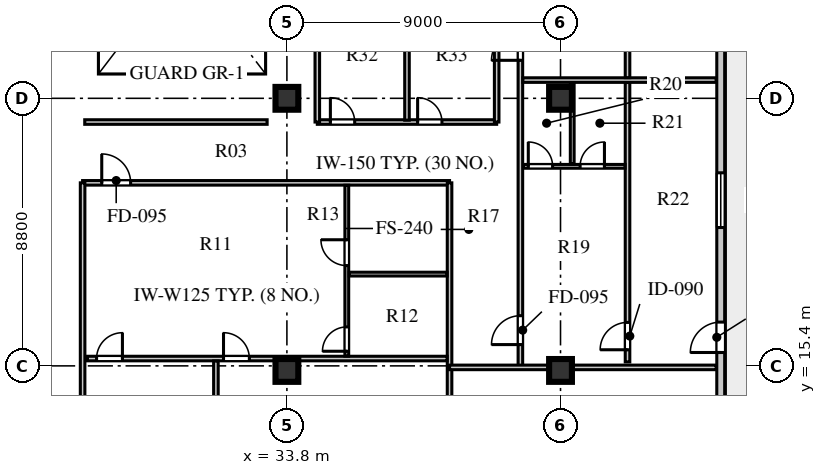
"""IFC4 building model, lengths in metres.
Left out: names, types, materials, properties, quantities, classifications, styles, units other than length and angle.
Written with IfcOpenShell. Run it as: python <this file> out.ifc"""

import sys

from ifc_helpers import new_model, si_unit, direction, frame, frame_2d, origin, origin_2d, place, context, subcontext, project, spatial, rectangle, extrude, element, fill, save


model = new_model("IFC4")
c1 = context("Model", 3, precision=1e-05, world=origin(), true_north=direction((0.0, 1.0)))
c2 = subcontext(c1, "Body", "Model", "MODEL_VIEW")
j1 = project(units=[si_unit("LENGTHUNIT", "METRE"), si_unit("PLANEANGLEUNIT", "RADIAN")], contexts=[c1])
p1 = place(None, origin())
s1 = spatial("IfcSite", under=j1, at=p1, CompositionType="ELEMENT")
p2 = place(p1, origin())
s2 = spatial("IfcBuilding", under=s1, at=p2, CompositionType="ELEMENT")
p3 = place(p2, frame((0.0, 0.0, 320.1)))
s3 = spatial("IfcBuildingStorey", under=s2, at=p3, CompositionType="ELEMENT", Elevation=320.1)
for number, where, z_axis, x_axis in (
    (1, (33.8, 15.25, 0.0), (0.0, 0.0, 1.0), (1.0, 0.0, 0.0)),
    (2, (33.8, 24.2, 0.0), (0.0, 0.0, 1.0), (1.0, 0.0, 0.0)),
    (3, (42.8, 15.25, 0.0), (0.0, 0.0, 1.0), (1.0, 0.0, 0.0)),
    (4, (42.8, 24.2, 0.0), (0.0, 0.0, 1.0), (1.0, 0.0, 0.0)),
):
    element("IfcColumn", number, at=place(p3, frame(where, z_axis=z_axis, x_axis=x_axis)), inside=s3, PredefinedType="COLUMN", context=c2, shape_type="SweptSolid", body=[
        extrude(rectangle(XDim=0.75, YDim=0.75, at=origin_2d()), origin(), (0.0, 0.0, 1.0), 3.56),
    ])
p4 = place(p3, frame((48.07, 13.41, 0.0), z_axis=(0.0, 0.0, 1.0), x_axis=(0.0, 1.0, 0.0)))
e5 = element("IfcWall", 5, at=p4, inside=s3, PredefinedType="SOLIDWALL", context=c2, shape_type="SweptSolid", body=[
    extrude(rectangle(XDim=30.38, YDim=0.26, at=frame_2d((15.19, 0.0))), origin(), (0.0, 0.0, 1.0), 3.56),
])
p5 = place(p4, frame((2.43, 0.0, 0.0)))
e6 = element("IfcOpeningElement", 6, at=p5, cuts=e5, PredefinedType="OPENING", context=c2, shape_type="SweptSolid", body=[
    extrude(rectangle(XDim=1.0, YDim=2.05, at=frame_2d((0.5, 1.025))), frame((0.0, 0.14, 0.0), z_axis=(0.0, -1.0, 0.0), x_axis=(1.0, 0.0, 0.0)), (0.0, 0.0, 1.0), 0.28),
])
p6 = place(p4, frame((6.54, 0.0, 0.8)))
e7 = element("IfcOpeningElement", 7, at=p6, cuts=e5, PredefinedType="OPENING", context=c2, shape_type="SweptSolid", body=[
    extrude(rectangle(XDim=1.8, YDim=2.0, at=frame_2d((0.9, 1.0))), frame((0.0, 0.14, 0.0), z_axis=(0.0, -1.0, 0.0), x_axis=(1.0, 0.0, 0.0)), (0.0, 0.0, 1.0), 0.28),
])
p7 = place(p4, frame((12.89, 0.0, 0.8)))
e8 = element("IfcOpeningElement", 8, at=p7, cuts=e5, PredefinedType="OPENING", context=c2, shape_type="SweptSolid", body=[
    extrude(rectangle(XDim=1.5, YDim=2.0, at=frame_2d((0.75, 1.0))), frame((0.0, 0.14, 0.0), z_axis=(0.0, -1.0, 0.0), x_axis=(1.0, 0.0, 0.0)), (0.0, 0.0, 1.0), 0.28),
])
p8 = place(p4, frame((17.54, 0.0, 0.8)))
e9 = element("IfcOpeningElement", 9, at=p8, cuts=e5, PredefinedType="OPENING", context=c2, shape_type="SweptSolid", body=[
    extrude(rectangle(XDim=1.2, YDim=1.75, at=frame_2d((0.6, 0.875))), frame((0.0, 0.14, 0.0), z_axis=(0.0, -1.0, 0.0), x_axis=(1.0, 0.0, 0.0)), (0.0, 0.0, 1.0), 0.28),
])
p9 = place(p4, frame((23.215, 0.0, 0.8)))
e10 = element("IfcOpeningElement", 10, at=p9, cuts=e5, PredefinedType="OPENING", context=c2, shape_type="SweptSolid", body=[
    extrude(rectangle(XDim=2.4, YDim=2.05, at=frame_2d((1.2, 1.025))), frame((0.0, 0.14, 0.0), z_axis=(0.0, -1.0, 0.0), x_axis=(1.0, 0.0, 0.0)), (0.0, 0.0, 1.0), 0.28),
])
p10 = place(p3, frame((27.08, 21.42, 0.0), z_axis=(0.0, 0.0, 1.0), x_axis=(1.0, 0.0, 0.0)))
e11 = element("IfcWall", 11, at=p10, inside=s3, PredefinedType="PARTITIONING", context=c2, shape_type="SweptSolid", body=[
    extrude(rectangle(XDim=12.07, YDim=0.15, at=frame_2d((6.035, 0.0))), origin(), (0.0, 0.0, 1.0), 3.26),
])
p11 = place(p10, frame((0.63, 0.0, 0.0)))
e12 = element("IfcOpeningElement", 12, at=p11, cuts=e11, PredefinedType="OPENING", context=c2, shape_type="SweptSolid", body=[
    extrude(rectangle(XDim=0.95, YDim=2.1, at=frame_2d((0.475, 1.05))), frame((0.0, 0.085, 0.0), z_axis=(0.0, -1.0, 0.0), x_axis=(1.0, 0.0, 0.0)), (0.0, 0.0, 1.0), 0.17),
])
p12 = place(p3, frame((27.08, 10.38, 0.0), z_axis=(0.0, 0.0, 1.0), x_axis=(0.0, 1.0, 0.0)))
e13 = element("IfcWall", 13, at=p12, inside=s3, PredefinedType="PARTITIONING", context=c2, shape_type="SweptSolid", body=[
    extrude(rectangle(XDim=11.04, YDim=0.15, at=frame_2d((5.52, 0.0))), origin(), (0.0, 0.0, 1.0), 3.56),
])
p13 = place(p3, frame((27.15, 23.42, 0.0), z_axis=(0.0, 0.0, 1.0), x_axis=(1.0, 0.0, 0.0)))
e14 = element("IfcWall", 14, at=p13, inside=s3, PredefinedType="PARTITIONING", context=c2, shape_type="SweptSolid", body=[
    extrude(rectangle(XDim=6.0, YDim=0.15, at=frame_2d((3.0, 0.0))), origin(), (0.0, 0.0, 1.0), 3.56),
])
p14 = place(p3, frame((39.15, 10.38, 0.0), z_axis=(0.0, 0.0, 1.0), x_axis=(0.0, 1.0, 0.0)))
e15 = element("IfcWall", 15, at=p14, inside=s3, PredefinedType="PARTITIONING", context=c2, shape_type="SweptSolid", body=[
    extrude(rectangle(XDim=11.04, YDim=0.15, at=frame_2d((5.52, 0.0))), origin(), (0.0, 0.0, 1.0), 3.56),
])
p15 = place(p3, frame((27.24, 15.641, 0.0), z_axis=(0.0, 0.0, 1.0), x_axis=(1.0, 0.0, 0.0)))
e16 = element("IfcWall", 16, at=p15, inside=s3, PredefinedType="PARTITIONING", context=c2, shape_type="SweptSolid", body=[
    extrude(rectangle(XDim=11.83, YDim=0.15, at=frame_2d((5.915, 0.0))), origin(), (0.0, 0.0, 1.0), 3.56),
])
p16 = place(p15, frame((0.3, 0.0, 0.0)))
e17 = element("IfcOpeningElement", 17, at=p16, cuts=e16, PredefinedType="OPENING", context=c2, shape_type="SweptSolid", body=[
    extrude(rectangle(XDim=0.85, YDim=2.08, at=frame_2d((0.425, 1.04))), frame((0.0, 0.085, 0.0), z_axis=(0.0, -1.0, 0.0), x_axis=(1.0, 0.0, 0.0)), (0.0, 0.0, 1.0), 0.17),
])
p17 = place(p15, frame((4.475, 0.0, 0.0)))
e18 = element("IfcOpeningElement", 18, at=p17, cuts=e16, PredefinedType="OPENING", context=c2, shape_type="SweptSolid", body=[
    extrude(rectangle(XDim=0.85, YDim=2.08, at=frame_2d((0.425, 1.04))), frame((0.0, 0.085, 0.0), z_axis=(0.0, -1.0, 0.0), x_axis=(1.0, 0.0, 0.0)), (0.0, 0.0, 1.0), 0.17),
])
p18 = place(p3, frame((35.77, 15.721, 0.0), z_axis=(0.0, 0.0, 1.0), x_axis=(0.0, 1.0, 0.0)))
e19 = element("IfcWall", 19, at=p18, inside=s3, PredefinedType="PLUMBINGWALL", context=c2, shape_type="SweptSolid", body=[
    extrude(rectangle(XDim=5.619, YDim=0.125, at=frame_2d((2.81, 0.0))), origin(), (0.0, 0.0, 1.0), 3.56),
])
p19 = place(p18, frame((0.16, 0.0, 0.0)))
e20 = element("IfcOpeningElement", 20, at=p19, cuts=e19, PredefinedType="OPENING", context=c2, shape_type="SweptSolid", body=[
    extrude(rectangle(XDim=0.8, YDim=2.05, at=frame_2d((0.4, 1.025))), frame((0.0, 0.073, 0.0), z_axis=(0.0, -1.0, 0.0), x_axis=(1.0, 0.0, 0.0)), (0.0, 0.0, 1.0), 0.145),
])
p20 = place(p18, frame((2.977, 0.0, 0.0)))
e21 = element("IfcOpeningElement", 21, at=p20, cuts=e19, PredefinedType="OPENING", context=c2, shape_type="SweptSolid", body=[
    extrude(rectangle(XDim=0.85, YDim=2.08, at=frame_2d((0.425, 1.04))), frame((0.0, 0.073, 0.0), z_axis=(0.0, -1.0, 0.0), x_axis=(1.0, 0.0, 0.0)), (0.0, 0.0, 1.0), 0.145),
])
p21 = place(p3, frame((35.85, 18.418, 0.0), z_axis=(0.0, 0.0, 1.0), x_axis=(1.0, 0.0, 0.0)))
e22 = element("IfcWall", 22, at=p21, inside=s3, PredefinedType="PLUMBINGWALL", context=c2, shape_type="SweptSolid", body=[
    extrude(rectangle(XDim=3.22, YDim=0.125, at=frame_2d((1.61, 0.0))), origin(), (0.0, 0.0, 1.0), 3.26),
])
p22 = place(p3, frame((31.465, 10.38, 0.0), z_axis=(0.0, 0.0, 1.0), x_axis=(0.0, 1.0, 0.0)))
e23 = element("IfcWall", 23, at=p22, inside=s3, PredefinedType="PARTITIONING", context=c2, shape_type="SweptSolid", body=[
    extrude(rectangle(XDim=5.181, YDim=0.15, at=frame_2d((2.591, 0.0))), origin(), (0.0, 0.0, 1.0), 3.56),
])
p23 = place(p3, frame((41.48, 15.35, 0.0), z_axis=(0.0, 0.0, 1.0), x_axis=(0.0, 1.0, 0.0)))
e24 = element("IfcWall", 24, at=p23, inside=s3, PredefinedType="PARTITIONING", context=c2, shape_type="SweptSolid", body=[
    extrude(rectangle(XDim=26.5, YDim=0.15, at=frame_2d((13.25, 0.0))), origin(), (0.0, 0.0, 1.0), 3.56),
])
p24 = place(p23, frame((0.75, 0.0, 0.0)))
e25 = element("IfcOpeningElement", 25, at=p24, cuts=e24, PredefinedType="OPENING", context=c2, shape_type="SweptSolid", body=[
    extrude(rectangle(XDim=0.95, YDim=2.1, at=frame_2d((0.475, 1.05))), frame((0.0, 0.085, 0.0), z_axis=(0.0, -1.0, 0.0), x_axis=(1.0, 0.0, 0.0)), (0.0, 0.0, 1.0), 0.17),
])
p25 = place(p23, frame((10.1, 0.0, 0.0)))
e26 = element("IfcOpeningElement", 26, at=p25, cuts=e24, PredefinedType="OPENING", context=c2, shape_type="SweptSolid", body=[
    extrude(rectangle(XDim=0.95, YDim=2.1, at=frame_2d((0.475, 1.05))), frame((0.0, 0.085, 0.0), z_axis=(0.0, -1.0, 0.0), x_axis=(1.0, 0.0, 0.0)), (0.0, 0.0, 1.0), 0.17),
])
p26 = place(p23, frame((19.1, 0.0, 0.0)))
e27 = element("IfcOpeningElement", 27, at=p26, cuts=e24, PredefinedType="OPENING", context=c2, shape_type="SweptSolid", body=[
    extrude(rectangle(XDim=0.95, YDim=2.1, at=frame_2d((0.475, 1.05))), frame((0.0, 0.085, 0.0), z_axis=(0.0, -1.0, 0.0), x_axis=(1.0, 0.0, 0.0)), (0.0, 0.0, 1.0), 0.17),
])
p27 = place(p3, frame((39.15, 15.35, 0.0), z_axis=(0.0, 0.0, 1.0), x_axis=(1.0, 0.0, 0.0)))
e28 = element("IfcWall", 28, at=p27, inside=s3, PredefinedType="PARTITIONING", context=c2, shape_type="SweptSolid", body=[
    extrude(rectangle(XDim=8.77, YDim=0.15, at=frame_2d((4.385, 0.0))), origin(), (0.0, 0.0, 1.0), 2.96),
])
p28 = place(p3, frame((45.004, 15.53, 0.0), z_axis=(0.0, 0.0, 1.0), x_axis=(0.0, 1.0, 0.0)))
e29 = element("IfcWall", 29, at=p28, inside=s3, PredefinedType="PARTITIONING", context=c2, shape_type="SweptSolid", body=[
    extrude(rectangle(XDim=9.19, YDim=0.15, at=frame_2d((4.595, 0.0))), origin(), (0.0, 0.0, 1.0), 3.56),
])
p29 = place(p28, frame((0.4, 0.0, 0.0)))
e30 = element("IfcOpeningElement", 30, at=p29, cuts=e29, PredefinedType="OPENING", context=c2, shape_type="SweptSolid", body=[
    extrude(rectangle(XDim=0.9, YDim=2.08, at=frame_2d((0.45, 1.04))), frame((0.0, 0.085, 0.0), z_axis=(0.0, -1.0, 0.0), x_axis=(1.0, 0.0, 0.0)), (0.0, 0.0, 1.0), 0.17),
])
p30 = place(p3, frame((41.58, 21.963, 0.0), z_axis=(0.0, 0.0, 1.0), x_axis=(1.0, 0.0, 0.0)))
e31 = element("IfcWall", 31, at=p30, inside=s3, PredefinedType="PLUMBINGWALL", context=c2, shape_type="SweptSolid", body=[
    extrude(rectangle(XDim=3.344, YDim=0.125, at=frame_2d((1.672, 0.0))), origin(), (0.0, 0.0, 1.0), 3.56),
])
p31 = place(p30, frame((0.16, 0.0, 0.0)))
e32 = element("IfcOpeningElement", 32, at=p31, cuts=e31, PredefinedType="OPENING", context=c2, shape_type="SweptSolid", body=[
    extrude(rectangle(XDim=0.8, YDim=2.05, at=frame_2d((0.4, 1.025))), frame((0.0, 0.073, 0.0), z_axis=(0.0, -1.0, 0.0), x_axis=(1.0, 0.0, 0.0)), (0.0, 0.0, 1.0), 0.145),
])
p32 = place(p30, frame((1.865, 0.0, 0.0)))
e33 = element("IfcOpeningElement", 33, at=p32, cuts=e31, PredefinedType="OPENING", context=c2, shape_type="SweptSolid", body=[
    extrude(rectangle(XDim=0.8, YDim=2.05, at=frame_2d((0.4, 1.025))), frame((0.0, 0.073, 0.0), z_axis=(0.0, -1.0, 0.0), x_axis=(1.0, 0.0, 0.0)), (0.0, 0.0, 1.0), 0.145),
])
p33 = place(p3, frame((43.185, 22.043, 0.0), z_axis=(0.0, 0.0, 1.0), x_axis=(0.0, 1.0, 0.0)))
e34 = element("IfcWall", 34, at=p33, inside=s3, PredefinedType="PLUMBINGWALL", context=c2, shape_type="SweptSolid", body=[
    extrude(rectangle(XDim=2.677, YDim=0.125, at=frame_2d((1.338, 0.0))), origin(), (0.0, 0.0, 1.0), 3.56),
])
p34 = place(p3, frame((41.56, 24.8, 0.0), z_axis=(0.0, 0.0, 1.0), x_axis=(1.0, 0.0, 0.0)))
e35 = element("IfcWall", 35, at=p34, inside=s3, PredefinedType="PARTITIONING", context=c2, shape_type="SweptSolid", body=[
    extrude(rectangle(XDim=6.36, YDim=0.15, at=frame_2d((3.18, 0.0))), origin(), (0.0, 0.0, 1.0), 3.56),
])
p35 = place(p3, frame((45.004, 24.88, 0.0), z_axis=(0.0, 0.0, 1.0), x_axis=(0.0, 1.0, 0.0)))
e36 = element("IfcWall", 36, at=p35, inside=s3, PredefinedType="PARTITIONING", context=c2, shape_type="SweptSolid", body=[
    extrude(rectangle(XDim=8.84, YDim=0.15, at=frame_2d((4.42, 0.0))), origin(), (0.0, 0.0, 1.0), 3.56),
])
p36 = place(p35, frame((3.37, 0.0, 0.0)))
e37 = element("IfcOpeningElement", 37, at=p36, cuts=e36, PredefinedType="OPENING", context=c2, shape_type="SweptSolid", body=[
    extrude(rectangle(XDim=0.85, YDim=2.08, at=frame_2d((0.425, 1.04))), frame((0.0, 0.085, 0.0), z_axis=(0.0, -1.0, 0.0), x_axis=(1.0, 0.0, 0.0)), (0.0, 0.0, 1.0), 0.17),
])
p37 = place(p35, frame((4.67, 0.0, 0.0)))
e38 = element("IfcOpeningElement", 38, at=p37, cuts=e36, PredefinedType="OPENING", context=c2, shape_type="SweptSolid", body=[
    extrude(rectangle(XDim=0.85, YDim=2.08, at=frame_2d((0.425, 1.04))), frame((0.0, 0.085, 0.0), z_axis=(0.0, -1.0, 0.0), x_axis=(1.0, 0.0, 0.0)), (0.0, 0.0, 1.0), 0.17),
])
p38 = place(p3, frame((34.8, 23.42, 0.0), z_axis=(0.0, 0.0, 1.0), x_axis=(1.0, 0.0, 0.0)))
e39 = element("IfcWall", 39, at=p38, inside=s3, PredefinedType="PARTITIONING", context=c2, shape_type="SweptSolid", body=[
    extrude(rectangle(XDim=5.9, YDim=0.15, at=frame_2d((2.95, 0.0))), origin(), (0.0, 0.0, 1.0), 3.56),
])
p39 = place(p38, frame((0.43, 0.0, 0.0)))
e40 = element("IfcOpeningElement", 40, at=p39, cuts=e39, PredefinedType="OPENING", context=c2, shape_type="SweptSolid", body=[
    extrude(rectangle(XDim=0.8, YDim=2.05, at=frame_2d((0.4, 1.025))), frame((0.0, 0.085, 0.0), z_axis=(0.0, -1.0, 0.0), x_axis=(1.0, 0.0, 0.0)), (0.0, 0.0, 1.0), 0.17),
])
p40 = place(p38, frame((3.3, 0.0, 0.0)))
e41 = element("IfcOpeningElement", 41, at=p40, cuts=e39, PredefinedType="OPENING", context=c2, shape_type="SweptSolid", body=[
    extrude(rectangle(XDim=0.8, YDim=2.05, at=frame_2d((0.4, 1.025))), frame((0.0, 0.085, 0.0), z_axis=(0.0, -1.0, 0.0), x_axis=(1.0, 0.0, 0.0)), (0.0, 0.0, 1.0), 0.17),
])
for number, where, z_axis, x_axis in (
    (42, (34.8, 23.42, 0.0), (0.0, 0.0, 1.0), (0.0, 1.0, 0.0)),
    (43, (40.7, 23.42, 0.0), (0.0, 0.0, 1.0), (0.0, 1.0, 0.0)),
):
    element("IfcWall", number, at=place(p3, frame(where, z_axis=z_axis, x_axis=x_axis)), inside=s3, PredefinedType="PARTITIONING", context=c2, shape_type="SweptSolid", body=[
        extrude(rectangle(XDim=3.78, YDim=0.15, at=frame_2d((1.89, 0.0))), origin(), (0.0, 0.0, 1.0), 3.56),
    ])
p41 = place(p3, frame((37.75, 23.48, 0.0), z_axis=(0.0, 0.0, 1.0), x_axis=(0.0, 1.0, 0.0)))
e44 = element("IfcWall", 44, at=p41, inside=s3, PredefinedType="PARTITIONING", context=c2, shape_type="SweptSolid", body=[
    extrude(rectangle(XDim=3.66, YDim=0.15, at=frame_2d((1.83, 0.0))), origin(), (0.0, 0.0, 1.0), 3.56),
])
p42 = place(p5, frame((1.0, 0.0, 0.0), z_axis=(0.0, 0.0, 1.0), x_axis=(-1.0, 0.0, 0.0)))
e45 = element("IfcDoor", 45, at=p42, inside=s3, OperationType="SINGLE_SWING_RIGHT", PredefinedType="DOOR", context=c2, shape_type="SweptSolid", body=[
    extrude(rectangle(XDim=1.0, YDim=2.05, at=frame_2d((0.5, 1.025))), frame((0.0, 0.025, 0.0), z_axis=(0.0, -1.0, 0.0), x_axis=(1.0, 0.0, 0.0)), (0.0, 0.0, 1.0), 0.05),
])
fill(e6, e45)
p43 = place(p6, origin())
e46 = element("IfcWindow", 46, at=p43, inside=s3, PartitioningType="SINGLE_PANEL", PredefinedType="WINDOW", context=c2, shape_type="SweptSolid", body=[
    extrude(rectangle(XDim=1.8, YDim=2.0, at=frame_2d((0.9, 1.0))), frame((0.0, 0.03, 0.0), z_axis=(0.0, -1.0, 0.0), x_axis=(1.0, 0.0, 0.0)), (0.0, 0.0, 1.0), 0.06),
])
fill(e7, e46)
p44 = place(p19, origin())
e47 = element("IfcDoor", 47, at=p44, inside=s3, OperationType="SINGLE_SWING_LEFT", PredefinedType="DOOR", context=c2, shape_type="SweptSolid", body=[
    extrude(rectangle(XDim=0.8, YDim=2.05, at=frame_2d((0.4, 1.025))), frame((0.0, 0.025, 0.0), z_axis=(0.0, -1.0, 0.0), x_axis=(1.0, 0.0, 0.0)), (0.0, 0.0, 1.0), 0.05),
])
fill(e20, e47)
p45 = place(p20, origin())
e48 = element("IfcDoor", 48, at=p45, inside=s3, OperationType="SINGLE_SWING_RIGHT", PredefinedType="DOOR", context=c2, shape_type="SweptSolid", body=[
    extrude(rectangle(XDim=0.85, YDim=2.08, at=frame_2d((0.425, 1.04))), frame((0.0, 0.025, 0.0), z_axis=(0.0, -1.0, 0.0), x_axis=(1.0, 0.0, 0.0)), (0.0, 0.0, 1.0), 0.05),
])
fill(e21, e48)
p46 = place(p16, frame((0.85, 0.0, 0.0), z_axis=(0.0, 0.0, 1.0), x_axis=(-1.0, 0.0, 0.0)))
e49 = element("IfcDoor", 49, at=p46, inside=s3, OperationType="SINGLE_SWING_LEFT", PredefinedType="DOOR", context=c2, shape_type="SweptSolid", body=[
    extrude(rectangle(XDim=0.85, YDim=2.08, at=frame_2d((0.425, 1.04))), frame((0.0, 0.025, 0.0), z_axis=(0.0, -1.0, 0.0), x_axis=(1.0, 0.0, 0.0)), (0.0, 0.0, 1.0), 0.05),
])
fill(e17, e49)
p47 = place(p17, frame((0.85, 0.0, 0.0), z_axis=(0.0, 0.0, 1.0), x_axis=(-1.0, 0.0, 0.0)))
e50 = element("IfcDoor", 50, at=p47, inside=s3, OperationType="SINGLE_SWING_RIGHT", PredefinedType="DOOR", context=c2, shape_type="SweptSolid", body=[
    extrude(rectangle(XDim=0.85, YDim=2.08, at=frame_2d((0.425, 1.04))), frame((0.0, 0.025, 0.0), z_axis=(0.0, -1.0, 0.0), x_axis=(1.0, 0.0, 0.0)), (0.0, 0.0, 1.0), 0.05),
])
fill(e18, e50)
p48 = place(p11, frame((0.95, 0.0, 0.0), z_axis=(0.0, 0.0, 1.0), x_axis=(-1.0, 0.0, 0.0)))
e51 = element("IfcDoor", 51, at=p48, inside=s3, OperationType="SINGLE_SWING_RIGHT", PredefinedType="DOOR", context=c2, shape_type="SweptSolid", body=[
    extrude(rectangle(XDim=0.95, YDim=2.1, at=frame_2d((0.475, 1.05))), frame((0.0, 0.025, 0.0), z_axis=(0.0, -1.0, 0.0), x_axis=(1.0, 0.0, 0.0)), (0.0, 0.0, 1.0), 0.05),
])
fill(e12, e51)
p49 = place(p31, origin())
e52 = element("IfcDoor", 52, at=p49, inside=s3, OperationType="SINGLE_SWING_LEFT", PredefinedType="DOOR", context=c2, shape_type="SweptSolid", body=[
    extrude(rectangle(XDim=0.8, YDim=2.05, at=frame_2d((0.4, 1.025))), frame((0.0, 0.025, 0.0), z_axis=(0.0, -1.0, 0.0), x_axis=(1.0, 0.0, 0.0)), (0.0, 0.0, 1.0), 0.05),
])
fill(e32, e52)
p50 = place(p32, origin())
e53 = element("IfcDoor", 53, at=p50, inside=s3, OperationType="SINGLE_SWING_RIGHT", PredefinedType="DOOR", context=c2, shape_type="SweptSolid", body=[
    extrude(rectangle(XDim=0.8, YDim=2.05, at=frame_2d((0.4, 1.025))), frame((0.0, 0.025, 0.0), z_axis=(0.0, -1.0, 0.0), x_axis=(1.0, 0.0, 0.0)), (0.0, 0.0, 1.0), 0.05),
])
fill(e33, e53)
p51 = place(p29, origin())
e54 = element("IfcDoor", 54, at=p51, inside=s3, OperationType="SINGLE_SWING_LEFT", PredefinedType="DOOR", context=c2, shape_type="SweptSolid", body=[
    extrude(rectangle(XDim=0.9, YDim=2.08, at=frame_2d((0.45, 1.04))), frame((0.0, 0.025, 0.0), z_axis=(0.0, -1.0, 0.0), x_axis=(1.0, 0.0, 0.0)), (0.0, 0.0, 1.0), 0.05),
])
fill(e30, e54)
p52 = place(p24, origin())
e55 = element("IfcDoor", 55, at=p52, inside=s3, OperationType="SINGLE_SWING_LEFT", PredefinedType="DOOR", context=c2, shape_type="SweptSolid", body=[
    extrude(rectangle(XDim=0.95, YDim=2.1, at=frame_2d((0.475, 1.05))), frame((0.0, 0.025, 0.0), z_axis=(0.0, -1.0, 0.0), x_axis=(1.0, 0.0, 0.0)), (0.0, 0.0, 1.0), 0.05),
])
fill(e25, e55)
p53 = place(p25, origin())
e56 = element("IfcDoor", 56, at=p53, inside=s3, OperationType="SINGLE_SWING_LEFT", PredefinedType="DOOR", context=c2, shape_type="SweptSolid", body=[
    extrude(rectangle(XDim=0.95, YDim=2.1, at=frame_2d((0.475, 1.05))), frame((0.0, 0.025, 0.0), z_axis=(0.0, -1.0, 0.0), x_axis=(1.0, 0.0, 0.0)), (0.0, 0.0, 1.0), 0.05),
])
fill(e26, e56)
p54 = place(p39, origin())
e57 = element("IfcDoor", 57, at=p54, inside=s3, OperationType="SINGLE_SWING_LEFT", PredefinedType="DOOR", context=c2, shape_type="SweptSolid", body=[
    extrude(rectangle(XDim=0.8, YDim=2.05, at=frame_2d((0.4, 1.025))), frame((0.0, 0.025, 0.0), z_axis=(0.0, -1.0, 0.0), x_axis=(1.0, 0.0, 0.0)), (0.0, 0.0, 1.0), 0.05),
])
fill(e40, e57)
p55 = place(p40, origin())
e58 = element("IfcDoor", 58, at=p55, inside=s3, OperationType="SINGLE_SWING_LEFT", PredefinedType="DOOR", context=c2, shape_type="SweptSolid", body=[
    extrude(rectangle(XDim=0.8, YDim=2.05, at=frame_2d((0.4, 1.025))), frame((0.0, 0.025, 0.0), z_axis=(0.0, -1.0, 0.0), x_axis=(1.0, 0.0, 0.0)), (0.0, 0.0, 1.0), 0.05),
])
fill(e41, e58)
save(model, sys.argv[1])
